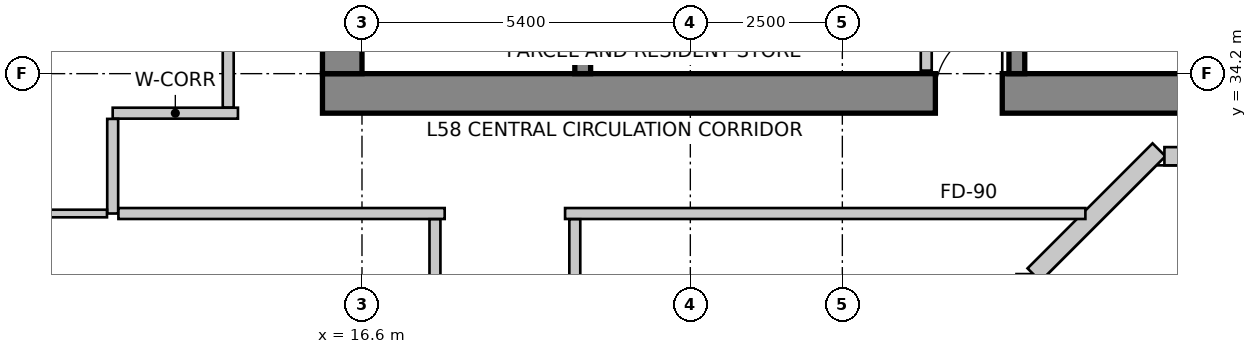
"""IFC4 building model, lengths in metres.
Left out: names, types, materials, properties, quantities, classifications, styles, units other than length and angle.
Written with IfcOpenShell. Run it as: python <this file> out.ifc"""

import sys

from ifc_helpers import new_model, si_unit, direction, frame, frame_2d, origin, place, context, subcontext, project, spatial, rectangle, extrude, source, transform, mapped, element, fill, save


model = new_model("IFC4")
c1 = context("Model", 3, precision=1e-05, world=origin(), true_north=direction((0.0, 1.0)))
c2 = subcontext(c1, "Body", "Model", "MODEL_VIEW")
j1 = project(units=[si_unit("LENGTHUNIT", "METRE"), si_unit("PLANEANGLEUNIT", "RADIAN")], contexts=[c1])
p1 = place(None, origin())
s1 = spatial("IfcSite", under=j1, at=p1, CompositionType="ELEMENT")
p2 = place(p1, origin())
s2 = spatial("IfcBuilding", under=s1, at=p2, CompositionType="ELEMENT")
p3 = place(p2, frame((0.0, 0.0, 228.9)))
s3 = spatial("IfcBuildingStorey", under=s2, at=p3, CompositionType="ELEMENT", Elevation=228.9)
p4 = place(p3, frame((15.95, 33.875, 0.0), z_axis=(0.0, 0.0, 1.0), x_axis=(1.0, 0.0, 0.0)))
e1 = element("IfcWall", 1, at=p4, inside=s3, PredefinedType="SHEAR", context=c2, shape_type="SweptSolid", body=[
    extrude(rectangle(XDim=15.7, YDim=0.65, at=frame_2d((7.85, 0.0))), origin(), (0.0, 0.0, 1.0), 3.5),
])
m1 = source(origin(), c2, "Body", "SweptSolid", [
    extrude(rectangle(XDim=1.1, YDim=2.15, at=frame_2d((0.55, 1.075))), frame((0.0, 0.335, 0.0), z_axis=(0.0, -1.0, 0.0), x_axis=(1.0, 0.0, 0.0)), (0.0, 0.0, 1.0), 0.67),
])
p5 = place(p4, frame((10.08, 0.0, 0.0)))
e2 = element("IfcOpeningElement", 2, at=p5, cuts=e1, PredefinedType="OPENING", context=c2, shape_type="MappedRepresentation", body=[
    mapped(m1, transform((0.0, 0.0, 0.0), scale=1.0)),
])
p6 = place(p3, frame((16.275, 34.2, 0.0), z_axis=(0.0, 0.0, 1.0), x_axis=(0.0, 1.0, 0.0)))
e3 = element("IfcWall", 3, at=p6, inside=s3, PredefinedType="SHEAR", context=c2, shape_type="SweptSolid", body=[
    extrude(rectangle(XDim=11.4, YDim=0.65, at=frame_2d((5.7, 0.0))), origin(), (0.0, 0.0, 1.0), 3.5),
])
p7 = place(p6, frame((7.15, 0.0, 0.0)))
e4 = element("IfcOpeningElement", 4, at=p7, cuts=e3, PredefinedType="OPENING", context=c2, shape_type="MappedRepresentation", body=[
    mapped(m1, transform((0.0, 0.0, 0.0), scale=1.0)),
])
p8 = place(p3, frame((20.23, 34.2, 0.0), z_axis=(0.0, 0.0, 1.0), x_axis=(0.0, 1.0, 0.0)))
e5 = element("IfcWall", 5, at=p8, inside=s3, PredefinedType="SHEAR", context=c2, shape_type="SweptSolid", body=[
    extrude(rectangle(XDim=9.06, YDim=0.26, at=frame_2d((4.53, 0.0))), origin(), (0.0, 0.0, 1.0), 3.5),
])
m2 = source(origin(), c2, "Body", "SweptSolid", [
    extrude(rectangle(XDim=1.1, YDim=2.15, at=frame_2d((0.55, 1.075))), frame((0.0, 0.14, 0.0), z_axis=(0.0, -1.0, 0.0), x_axis=(1.0, 0.0, 0.0)), (0.0, 0.0, 1.0), 0.28),
])
p9 = place(p8, frame((7.45, 0.0, 0.0)))
e6 = element("IfcOpeningElement", 6, at=p9, cuts=e5, PredefinedType="OPENING", context=c2, shape_type="MappedRepresentation", body=[
    mapped(m2, transform((0.0, 0.0, 0.0), scale=1.0)),
])
p10 = place(p3, frame((27.37, 34.2, 0.0), z_axis=(0.0, 0.0, 1.0), x_axis=(0.0, 1.0, 0.0)))
e7 = element("IfcWall", 7, at=p10, inside=s3, PredefinedType="SHEAR", context=c2, shape_type="SweptSolid", body=[
    extrude(rectangle(XDim=9.06, YDim=0.26, at=frame_2d((4.53, 0.0))), origin(), (0.0, 0.0, 1.0), 3.5),
])
p11 = place(p10, frame((7.45, 0.0, 0.0)))
e8 = element("IfcOpeningElement", 8, at=p11, cuts=e7, PredefinedType="OPENING", context=c2, shape_type="MappedRepresentation", body=[
    mapped(m2, transform((0.0, 0.0, 0.0), scale=1.0)),
])
p12 = place(p3, frame((27.514, 29.677, 0.0), z_axis=(0.0, 0.0, 1.0), x_axis=(0.0, 1.0, 0.0)))
e9 = element("IfcWall", 9, at=p12, inside=s3, PredefinedType="SOLIDWALL", context=c2, shape_type="SweptSolid", body=[
    extrude(rectangle(XDim=1.228, YDim=0.3, at=frame_2d((0.614, 0.0))), origin(), (0.0, 0.0, 1.0), 3.25),
])
p13 = place(p3, frame((27.652, 30.892, 0.0), z_axis=(0.0, 0.0, 1.0), x_axis=(0.707106781187, 0.707106781187, 0.0)))
e10 = element("IfcWall", 10, at=p13, inside=s3, PredefinedType="SOLIDWALL", context=c2, shape_type="SweptSolid", body=[
    extrude(rectangle(XDim=2.907, YDim=0.3, at=frame_2d((1.454, 0.0))), origin(), (0.0, 0.0, 1.0), 3.25),
])
p14 = place(p3, frame((29.797, 32.842, 0.0), z_axis=(0.0, 0.0, 1.0), x_axis=(1.0, 0.0, 0.0)))
e11 = element("IfcWall", 11, at=p14, inside=s3, PredefinedType="SOLIDWALL", context=c2, shape_type="SweptSolid", body=[
    extrude(rectangle(XDim=12.491, YDim=0.3, at=frame_2d((6.245, 0.0))), origin(), (0.0, 0.0, 1.0), 3.25),
])
m3 = source(origin(), c2, "Body", "SweptSolid", [
    extrude(rectangle(XDim=1.6, YDim=2.15, at=frame_2d((0.8, 1.075))), frame((0.0, 0.16, 0.0), z_axis=(0.0, -1.0, 0.0), x_axis=(1.0, 0.0, 0.0)), (0.0, 0.0, 1.0), 0.32),
])
p15 = place(p14, frame((4.403, 0.0, 0.0)))
e12 = element("IfcOpeningElement", 12, at=p15, cuts=e11, PredefinedType="OPENING", context=c2, shape_type="MappedRepresentation", body=[
    mapped(m3, transform((0.0, 0.0, 0.0), scale=1.0)),
])
m4 = source(origin(), c2, "Body", "SweptSolid", [
    extrude(rectangle(XDim=2.4, YDim=2.2, at=frame_2d((1.2, 1.1))), frame((0.0, 0.16, 0.0), z_axis=(0.0, -1.0, 0.0), x_axis=(1.0, 0.0, 0.0)), (0.0, 0.0, 1.0), 0.32),
])
p16 = place(p14, frame((1.021, 0.0, 0.85)))
e13 = element("IfcOpeningElement", 13, at=p16, cuts=e11, PredefinedType="OPENING", context=c2, shape_type="MappedRepresentation", body=[
    mapped(m4, transform((0.0, 0.0, 0.0), scale=1.0)),
])
p17 = place(p14, frame((8.027, 0.0, 0.85)))
e14 = element("IfcOpeningElement", 14, at=p17, cuts=e11, PredefinedType="OPENING", context=c2, shape_type="MappedRepresentation", body=[
    mapped(m4, transform((0.0, 0.0, 0.0), scale=1.0)),
])
p18 = place(p3, frame((13.269, 47.134, 0.0), z_axis=(0.0, 0.0, 1.0), x_axis=(-0.319920776449, -0.947444297464, 0.0)))
e15 = element("IfcWall", 15, at=p18, inside=s3, PredefinedType="SOLIDWALL", context=c2, shape_type="SweptSolid", body=[
    extrude(rectangle(XDim=16.133, YDim=0.3, at=frame_2d((8.067, 0.0))), origin(), (0.0, 0.0, 1.0), 3.25),
])
p19 = place(p18, frame((2.363, 0.0, 0.85)))
e16 = element("IfcOpeningElement", 16, at=p19, cuts=e15, PredefinedType="OPENING", context=c2, shape_type="MappedRepresentation", body=[
    mapped(m4, transform((0.0, 0.0, 0.0), scale=1.0)),
])
m5 = source(origin(), c2, "Body", "SweptSolid", [
    extrude(rectangle(XDim=2.1, YDim=2.0, at=frame_2d((1.05, 1.0))), frame((0.0, 0.16, 0.0), z_axis=(0.0, -1.0, 0.0), x_axis=(1.0, 0.0, 0.0)), (0.0, 0.0, 1.0), 0.32),
])
p20 = place(p18, frame((7.41, 0.0, 0.85)))
e17 = element("IfcOpeningElement", 17, at=p20, cuts=e15, PredefinedType="OPENING", context=c2, shape_type="MappedRepresentation", body=[
    mapped(m5, transform((0.0, 0.0, 0.0), scale=1.0)),
])
p21 = place(p18, frame((12.157, 0.0, 0.85)))
e18 = element("IfcOpeningElement", 18, at=p21, cuts=e15, PredefinedType="OPENING", context=c2, shape_type="MappedRepresentation", body=[
    mapped(m4, transform((0.0, 0.0, 0.0), scale=1.0)),
])
p22 = place(p3, frame((8.188, 31.834, 0.0), z_axis=(0.0, 0.0, 1.0), x_axis=(0.202303475707, -0.979322880217, 0.0)))
e19 = element("IfcWall", 19, at=p22, inside=s3, PredefinedType="SOLIDWALL", context=c2, shape_type="SweptSolid", body=[
    extrude(rectangle(XDim=15.766, YDim=0.3, at=frame_2d((7.883, 0.0))), origin(), (0.0, 0.0, 1.0), 3.25),
])
p23 = place(p22, frame((1.623, 0.0, 0.85)))
e20 = element("IfcOpeningElement", 20, at=p23, cuts=e19, PredefinedType="OPENING", context=c2, shape_type="MappedRepresentation", body=[
    mapped(m5, transform((0.0, 0.0, 0.0), scale=1.0)),
])
p24 = place(p22, frame((6.18, 0.0, 0.85)))
e21 = element("IfcOpeningElement", 21, at=p24, cuts=e19, PredefinedType="OPENING", context=c2, shape_type="MappedRepresentation", body=[
    mapped(m4, transform((0.0, 0.0, 0.0), scale=1.0)),
])
p25 = place(p22, frame((11.037, 0.0, 0.85)))
e22 = element("IfcOpeningElement", 22, at=p25, cuts=e19, PredefinedType="OPENING", context=c2, shape_type="MappedRepresentation", body=[
    mapped(m5, transform((0.0, 0.0, 0.0), scale=1.0)),
])
p26 = place(p3, frame((25.88, 35.956, 0.0), z_axis=(0.0, 0.0, 1.0), x_axis=(0.0, -1.0, 0.0)))
e23 = element("IfcWall", 23, at=p26, inside=s3, PredefinedType="PARTITIONING", context=c2, shape_type="SweptSolid", body=[
    extrude(rectangle(XDim=1.706, YDim=0.18, at=frame_2d((0.853, 0.0))), origin(), (0.0, 0.0, 1.0), 2.542),
])
p27 = place(p3, frame((12.5, 33.55, 0.0), z_axis=(0.0, 0.0, 1.0), x_axis=(1.0, 0.0, 0.0)))
e24 = element("IfcWall", 24, at=p27, inside=s3, PredefinedType="PARTITIONING", context=c2, shape_type="SweptSolid", body=[
    extrude(rectangle(XDim=2.06, YDim=0.18, at=frame_2d((1.03, 0.0))), origin(), (0.0, 0.0, 1.0), 3.25),
])
p28 = place(p3, frame((12.5, 31.9, 0.0), z_axis=(0.0, 0.0, 1.0), x_axis=(0.0, 1.0, 0.0)))
e25 = element("IfcWall", 25, at=p28, inside=s3, PredefinedType="PARTITIONING", context=c2, shape_type="SweptSolid", body=[
    extrude(rectangle(XDim=1.556, YDim=0.18, at=frame_2d((0.778, 0.0))), origin(), (0.0, 0.0, 1.0), 2.919),
])
p29 = place(p3, frame((17.96, 31.9, 0.0), z_axis=(0.0, 0.0, 1.0), x_axis=(-1.0, 0.0, 0.0)))
e26 = element("IfcWall", 26, at=p29, inside=s3, PredefinedType="PARTITIONING", context=c2, shape_type="SweptSolid", body=[
    extrude(rectangle(XDim=5.366, YDim=0.18, at=frame_2d((2.683, 0.0))), origin(), (0.0, 0.0, 1.0), 2.919),
])
p30 = place(p3, frame((28.497, 31.9, 0.0), z_axis=(0.0, 0.0, 1.0), x_axis=(-1.0, 0.0, 0.0)))
e27 = element("IfcWall", 27, at=p30, inside=s3, PredefinedType="PARTITIONING", context=c2, shape_type="SweptSolid", body=[
    extrude(rectangle(XDim=8.557, YDim=0.18, at=frame_2d((4.279, 0.0))), origin(), (0.0, 0.0, 1.0), 2.919),
])
p31 = place(p3, frame((14.4, 33.644, 0.0), z_axis=(0.0, 0.0, 1.0), x_axis=(0.0, 1.0, 0.0)))
e28 = element("IfcWall", 28, at=p31, inside=s3, PredefinedType="PARTITIONING", context=c2, shape_type="SweptSolid", body=[
    extrude(rectangle(XDim=12.606, YDim=0.18, at=frame_2d((6.303, 0.0))), origin(), (0.0, 0.0, 1.0), 3.25),
])
m6 = source(origin(), c2, "Body", "SweptSolid", [
    extrude(rectangle(XDim=0.9, YDim=2.15, at=frame_2d((0.45, 1.075))), frame((0.0, 0.1, 0.0), z_axis=(0.0, -1.0, 0.0), x_axis=(1.0, 0.0, 0.0)), (0.0, 0.0, 1.0), 0.2),
])
p32 = place(p31, frame((4.399, 0.0, 0.0)))
e29 = element("IfcOpeningElement", 29, at=p32, cuts=e28, PredefinedType="OPENING", context=c2, shape_type="MappedRepresentation", body=[
    mapped(m6, transform((0.0, 0.0, 0.0), scale=1.0)),
])
p33 = place(p3, frame((12.406, 31.9, 0.0), z_axis=(0.0, 0.0, 1.0), x_axis=(-1.0, 0.0, 0.0)))
e30 = element("IfcWall", 30, at=p33, inside=s3, PredefinedType="PARTITIONING", context=c2, shape_type="SweptSolid", body=[
    extrude(rectangle(XDim=4.115, YDim=0.125, at=frame_2d((2.057, 0.0))), origin(), (0.0, 0.0, 1.0), 2.542),
])
p34 = place(p3, frame((17.8, 17.5, 0.0), z_axis=(0.0, 0.0, 1.0), x_axis=(0.0, 1.0, 0.0)))
e31 = element("IfcWall", 31, at=p34, inside=s3, PredefinedType="PARTITIONING", context=c2, shape_type="SweptSolid", body=[
    extrude(rectangle(XDim=14.306, YDim=0.18, at=frame_2d((7.153, 0.0))), origin(), (0.0, 0.0, 1.0), 2.766),
])
p35 = place(p34, frame((6.643, 0.0, 0.0)))
e32 = element("IfcOpeningElement", 32, at=p35, cuts=e31, PredefinedType="OPENING", context=c2, shape_type="MappedRepresentation", body=[
    mapped(m6, transform((0.0, 0.0, 0.0), scale=1.0)),
])
p36 = place(p3, frame((20.1, 31.806, 0.0), z_axis=(0.0, 0.0, 1.0), x_axis=(0.0, -1.0, 0.0)))
e33 = element("IfcWall", 33, at=p36, inside=s3, PredefinedType="PARTITIONING", context=c2, shape_type="SweptSolid", body=[
    extrude(rectangle(XDim=14.306, YDim=0.18, at=frame_2d((7.153, 0.0))), origin(), (0.0, 0.0, 1.0), 2.766),
])
p37 = place(p36, frame((6.643, 0.0, 0.0)))
e34 = element("IfcOpeningElement", 34, at=p37, cuts=e33, PredefinedType="OPENING", context=c2, shape_type="MappedRepresentation", body=[
    mapped(m6, transform((0.0, 0.0, 0.0), scale=1.0)),
])
m7 = source(origin(), c2, "Body", "SweptSolid", [
    extrude(rectangle(XDim=1.1, YDim=2.15, at=frame_2d((0.55, 1.075))), frame((0.0, 0.025, 0.0), z_axis=(0.0, -1.0, 0.0), x_axis=(1.0, 0.0, 0.0)), (0.0, 0.0, 1.0), 0.05),
])
p38 = place(p5, origin())
e35 = element("IfcDoor", 35, at=p38, inside=s3, OperationType="SINGLE_SWING_RIGHT", PredefinedType="DOOR", context=c2, shape_type="MappedRepresentation", body=[
    mapped(m7, transform((0.0, 0.0, 0.0), scale=1.0)),
])
fill(e2, e35)
save(model, sys.argv[1])
